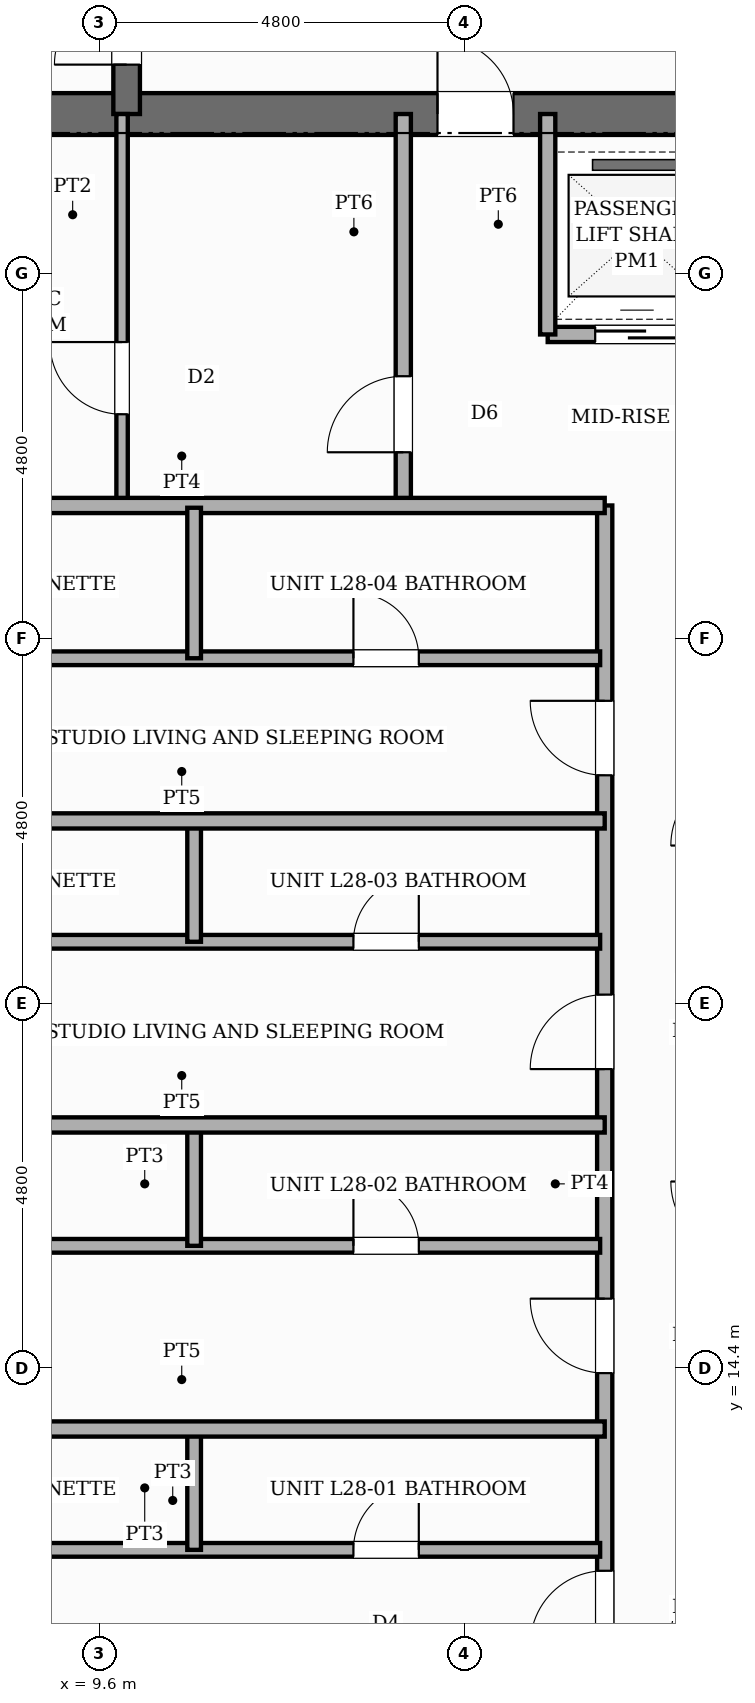
"""IFC4 building model, lengths in metres.
Left out: names, types, materials, properties, quantities, classifications, styles, units other than length and angle.
Written with IfcOpenShell. Run it as: python <this file> out.ifc"""

import sys

from ifc_helpers import new_model, si_unit, direction, frame, frame_2d, origin, place, context, subcontext, project, spatial, rectangle, extrude, element, fill, save


model = new_model("IFC4")
c1 = context("Model", 3, precision=1e-05, world=origin(), true_north=direction((0.0, 1.0)))
c2 = subcontext(c1, "Body", "Model", "MODEL_VIEW")
j1 = project(units=[si_unit("LENGTHUNIT", "METRE"), si_unit("PLANEANGLEUNIT", "RADIAN")], contexts=[c1])
p1 = place(None, origin())
s1 = spatial("IfcSite", under=j1, at=p1, CompositionType="ELEMENT")
p2 = place(p1, origin())
s2 = spatial("IfcBuilding", under=s1, at=p2, CompositionType="ELEMENT")
p3 = place(p2, frame((0.0, 0.0, 110.8)))
s3 = spatial("IfcBuildingStorey", under=s2, at=p3, CompositionType="ELEMENT", Elevation=110.8)
p4 = place(p3, frame((6.05, 30.9, 0.0), z_axis=(0.0, 0.0, 1.0), x_axis=(1.0, 0.0, 0.0)))
e1 = element("IfcWall", 1, at=p4, inside=s3, PredefinedType="SHEAR", context=c2, shape_type="SweptSolid", body=[
    extrude(rectangle(XDim=3.91, YDim=0.55, at=frame_2d((1.955, 0.0))), origin(), (0.0, 0.0, 1.0), 3.6),
])
p5 = place(p3, frame((9.96, 30.9, 0.0), z_axis=(0.0, 0.0, 1.0), x_axis=(1.0, 0.0, 0.0)))
e2 = element("IfcWall", 2, at=p5, inside=s3, PredefinedType="SHEAR", context=c2, shape_type="SweptSolid", body=[
    extrude(rectangle(XDim=8.88, YDim=0.55, at=frame_2d((4.44, 0.0))), origin(), (0.0, 0.0, 1.0), 3.6),
])
p6 = place(p5, frame((4.09, 0.0, 0.0)))
e3 = element("IfcOpeningElement", 3, at=p6, cuts=e2, PredefinedType="OPENING", context=c2, shape_type="SweptSolid", body=[
    extrude(rectangle(XDim=1.0, YDim=2.15, at=frame_2d((0.5, 1.075))), frame((0.0, 0.285, 0.0), z_axis=(0.0, -1.0, 0.0), x_axis=(1.0, 0.0, 0.0)), (0.0, 0.0, 1.0), 0.57),
])
p7 = place(p3, frame((9.96, 30.9, 0.0), z_axis=(0.0, 0.0, 1.0), x_axis=(0.0, 1.0, 0.0)))
e4 = element("IfcWall", 4, at=p7, inside=s3, PredefinedType="SHEAR", context=c2, shape_type="SweptSolid", body=[
    extrude(rectangle(XDim=14.9, YDim=0.35, at=frame_2d((7.45, 0.0))), origin(), (0.0, 0.0, 1.0), 3.6),
])
p8 = place(p7, frame((0.65, 0.0, 0.0)))
e5 = element("IfcOpeningElement", 5, at=p8, cuts=e4, PredefinedType="OPENING", context=c2, shape_type="SweptSolid", body=[
    extrude(rectangle(XDim=0.95, YDim=2.1, at=frame_2d((0.475, 1.05))), frame((0.0, 0.185, 0.0), z_axis=(0.0, -1.0, 0.0), x_axis=(1.0, 0.0, 0.0)), (0.0, 0.0, 1.0), 0.37),
])
p9 = place(p7, frame((10.45, 0.0, 0.0)))
e6 = element("IfcOpeningElement", 6, at=p9, cuts=e4, PredefinedType="OPENING", context=c2, shape_type="SweptSolid", body=[
    extrude(rectangle(XDim=1.0, YDim=2.15, at=frame_2d((0.5, 1.075))), frame((0.0, 0.185, 0.0), z_axis=(0.0, -1.0, 0.0), x_axis=(1.0, 0.0, 0.0)), (0.0, 0.0, 1.0), 0.37),
])
p10 = place(p3, frame((13.6, 25.75, 0.0), z_axis=(0.0, 0.0, 1.0), x_axis=(0.0, 1.0, 0.0)))
e7 = element("IfcWall", 7, at=p10, inside=s3, PredefinedType="POLYGONAL", context=c2, shape_type="SweptSolid", body=[
    extrude(rectangle(XDim=5.15, YDim=0.2, at=frame_2d((2.575, 0.0))), origin(), (0.0, 0.0, 1.0), 3.36),
])
p11 = place(p10, frame((0.7, 0.0, 0.0)))
e8 = element("IfcOpeningElement", 8, at=p11, cuts=e7, PredefinedType="OPENING", context=c2, shape_type="SweptSolid", body=[
    extrude(rectangle(XDim=1.0, YDim=2.15, at=frame_2d((0.5, 1.075))), frame((0.0, 0.11, 0.0), z_axis=(0.0, -1.0, 0.0), x_axis=(1.0, 0.0, 0.0)), (0.0, 0.0, 1.0), 0.22),
])
p12 = place(p3, frame((9.9, 25.75, 0.0), z_axis=(0.0, 0.0, 1.0), x_axis=(0.0, 1.0, 0.0)))
e9 = element("IfcWall", 9, at=p12, inside=s3, PredefinedType="PARTITIONING", context=c2, shape_type="SweptSolid", body=[
    extrude(rectangle(XDim=5.15, YDim=0.15, at=frame_2d((2.575, 0.0))), origin(), (0.0, 0.0, 1.0), 3.36),
])
p13 = place(p12, frame((1.2, 0.0, 0.0)))
e10 = element("IfcOpeningElement", 10, at=p13, cuts=e9, PredefinedType="OPENING", context=c2, shape_type="SweptSolid", body=[
    extrude(rectangle(XDim=0.95, YDim=2.15, at=frame_2d((0.475, 1.075))), frame((0.0, 0.085, 0.0), z_axis=(0.0, -1.0, 0.0), x_axis=(1.0, 0.0, 0.0)), (0.0, 0.0, 1.0), 0.17),
])
p14 = place(p3, frame((15.5, 28.0, 0.0), z_axis=(0.0, 0.0, 1.0), x_axis=(1.0, 0.0, 0.0)))
e11 = element("IfcWall", 11, at=p14, inside=s3, PredefinedType="POLYGONAL", context=c2, shape_type="SweptSolid", body=[
    extrude(rectangle(XDim=7.25, YDim=0.2, at=frame_2d((3.625, 0.0))), origin(), (0.0, 0.0, 1.0), 3.36),
])
p15 = place(p14, frame((0.625, 0.0, 0.0)))
e12 = element("IfcOpeningElement", 12, at=p15, cuts=e11, PredefinedType="OPENING", context=c2, shape_type="SweptSolid", body=[
    extrude(rectangle(XDim=1.1, YDim=2.15, at=frame_2d((0.55, 1.075))), frame((0.0, 0.11, 0.0), z_axis=(0.0, -1.0, 0.0), x_axis=(1.0, 0.0, 0.0)), (0.0, 0.0, 1.0), 0.22),
])
p16 = place(p14, frame((3.075, 0.0, 0.0)))
e13 = element("IfcOpeningElement", 13, at=p16, cuts=e11, PredefinedType="OPENING", context=c2, shape_type="SweptSolid", body=[
    extrude(rectangle(XDim=1.1, YDim=2.15, at=frame_2d((0.55, 1.075))), frame((0.0, 0.11, 0.0), z_axis=(0.0, -1.0, 0.0), x_axis=(1.0, 0.0, 0.0)), (0.0, 0.0, 1.0), 0.22),
])
p17 = place(p14, frame((5.525, 0.0, 0.0)))
e14 = element("IfcOpeningElement", 14, at=p17, cuts=e11, PredefinedType="OPENING", context=c2, shape_type="SweptSolid", body=[
    extrude(rectangle(XDim=1.1, YDim=2.15, at=frame_2d((0.55, 1.075))), frame((0.0, 0.11, 0.0), z_axis=(0.0, -1.0, 0.0), x_axis=(1.0, 0.0, 0.0)), (0.0, 0.0, 1.0), 0.22),
])
p18 = place(p3, frame((15.5, 28.0, 0.0), z_axis=(0.0, 0.0, 1.0), x_axis=(0.0, 1.0, 0.0)))
e15 = element("IfcWall", 15, at=p18, inside=s3, PredefinedType="POLYGONAL", context=c2, shape_type="SweptSolid", body=[
    extrude(rectangle(XDim=2.9, YDim=0.2, at=frame_2d((1.45, 0.0))), origin(), (0.0, 0.0, 1.0), 3.36),
])
p19 = place(p3, frame((16.25, 9.92, 0.0), z_axis=(0.0, 0.0, 1.0), x_axis=(0.0, 1.0, 0.0)))
e16 = element("IfcWall", 16, at=p19, inside=s3, PredefinedType="PARTITIONING", context=c2, shape_type="SweptSolid", body=[
    extrude(rectangle(XDim=15.83, YDim=0.2, at=frame_2d((7.915, 0.0))), origin(), (0.0, 0.0, 1.0), 3.36),
])
p20 = place(p19, frame((0.835, 0.0, 0.0)))
e17 = element("IfcOpeningElement", 17, at=p20, cuts=e16, PredefinedType="OPENING", context=c2, shape_type="SweptSolid", body=[
    extrude(rectangle(XDim=0.98, YDim=2.18, at=frame_2d((0.49, 1.09))), frame((0.0, 0.11, 0.0), z_axis=(0.0, -1.0, 0.0), x_axis=(1.0, 0.0, 0.0)), (0.0, 0.0, 1.0), 0.22),
])
p21 = place(p19, frame((4.415, 0.0, 0.0)))
e18 = element("IfcOpeningElement", 18, at=p21, cuts=e16, PredefinedType="OPENING", context=c2, shape_type="SweptSolid", body=[
    extrude(rectangle(XDim=0.98, YDim=2.18, at=frame_2d((0.49, 1.09))), frame((0.0, 0.11, 0.0), z_axis=(0.0, -1.0, 0.0), x_axis=(1.0, 0.0, 0.0)), (0.0, 0.0, 1.0), 0.22),
])
p22 = place(p19, frame((8.415, 0.0, 0.0)))
e19 = element("IfcOpeningElement", 19, at=p22, cuts=e16, PredefinedType="OPENING", context=c2, shape_type="SweptSolid", body=[
    extrude(rectangle(XDim=0.98, YDim=2.18, at=frame_2d((0.49, 1.09))), frame((0.0, 0.11, 0.0), z_axis=(0.0, -1.0, 0.0), x_axis=(1.0, 0.0, 0.0)), (0.0, 0.0, 1.0), 0.22),
])
p23 = place(p19, frame((12.28, 0.0, 0.0)))
e20 = element("IfcOpeningElement", 20, at=p23, cuts=e16, PredefinedType="OPENING", context=c2, shape_type="SweptSolid", body=[
    extrude(rectangle(XDim=0.98, YDim=2.18, at=frame_2d((0.49, 1.09))), frame((0.0, 0.11, 0.0), z_axis=(0.0, -1.0, 0.0), x_axis=(1.0, 0.0, 0.0)), (0.0, 0.0, 1.0), 0.22),
])
p24 = place(p3, frame((5.12, 25.75, 0.0), z_axis=(0.0, 0.0, 1.0), x_axis=(1.0, 0.0, 0.0)))
e21 = element("IfcWall", 21, at=p24, inside=s3, PredefinedType="PARTITIONING", context=c2, shape_type="SweptSolid", body=[
    extrude(rectangle(XDim=11.13, YDim=0.2, at=frame_2d((5.565, 0.0))), origin(), (0.0, 0.0, 1.0), 3.36),
])
p25 = place(p3, frame((5.14, 12.01, 0.0), z_axis=(0.0, 0.0, 1.0), x_axis=(1.0, 0.0, 0.0)))
e22 = element("IfcWall", 22, at=p25, inside=s3, PredefinedType="PLUMBINGWALL", context=c2, shape_type="SweptSolid", body=[
    extrude(rectangle(XDim=11.05, YDim=0.18, at=frame_2d((5.525, 0.0))), origin(), (0.0, 0.0, 1.0), 3.36),
])
p26 = place(p25, frame((2.189, 0.0, 0.0)))
e23 = element("IfcOpeningElement", 23, at=p26, cuts=e22, PredefinedType="OPENING", context=c2, shape_type="SweptSolid", body=[
    extrude(rectangle(XDim=0.86, YDim=2.1, at=frame_2d((0.43, 1.05))), frame((0.0, 0.1, 0.0), z_axis=(0.0, -1.0, 0.0), x_axis=(1.0, 0.0, 0.0)), (0.0, 0.0, 1.0), 0.2),
])
p27 = place(p25, frame((7.804, 0.0, 0.0)))
e24 = element("IfcOpeningElement", 24, at=p27, cuts=e22, PredefinedType="OPENING", context=c2, shape_type="SweptSolid", body=[
    extrude(rectangle(XDim=0.86, YDim=2.1, at=frame_2d((0.43, 1.05))), frame((0.0, 0.1, 0.0), z_axis=(0.0, -1.0, 0.0), x_axis=(1.0, 0.0, 0.0)), (0.0, 0.0, 1.0), 0.2),
])
p28 = place(p3, frame((10.848, 12.01, 0.0), z_axis=(0.0, 0.0, 1.0), x_axis=(0.0, 1.0, 0.0)))
e25 = element("IfcWall", 25, at=p28, inside=s3, PredefinedType="PLUMBINGWALL", context=c2, shape_type="SweptSolid", body=[
    extrude(rectangle(XDim=1.63, YDim=0.18, at=frame_2d((0.815, 0.0))), origin(), (0.0, 0.0, 1.0), 3.36),
])
p29 = place(p3, frame((5.12, 13.6, 0.0), z_axis=(0.0, 0.0, 1.0), x_axis=(1.0, 0.0, 0.0)))
e26 = element("IfcWall", 26, at=p29, inside=s3, PredefinedType="SOLIDWALL", context=c2, shape_type="SweptSolid", body=[
    extrude(rectangle(XDim=11.13, YDim=0.2, at=frame_2d((5.565, 0.0))), origin(), (0.0, 0.0, 1.0), 3.36),
])
p30 = place(p3, frame((5.12, 16.01, 0.0), z_axis=(0.0, 0.0, 1.0), x_axis=(1.0, 0.0, 0.0)))
e27 = element("IfcWall", 27, at=p30, inside=s3, PredefinedType="PLUMBINGWALL", context=c2, shape_type="SweptSolid", body=[
    extrude(rectangle(XDim=11.07, YDim=0.18, at=frame_2d((5.535, 0.0))), origin(), (0.0, 0.0, 1.0), 3.36),
])
p31 = place(p30, frame((2.209, 0.0, 0.0)))
e28 = element("IfcOpeningElement", 28, at=p31, cuts=e27, PredefinedType="OPENING", context=c2, shape_type="SweptSolid", body=[
    extrude(rectangle(XDim=0.86, YDim=2.1, at=frame_2d((0.43, 1.05))), frame((0.0, 0.1, 0.0), z_axis=(0.0, -1.0, 0.0), x_axis=(1.0, 0.0, 0.0)), (0.0, 0.0, 1.0), 0.2),
])
p32 = place(p30, frame((7.824, 0.0, 0.0)))
e29 = element("IfcOpeningElement", 29, at=p32, cuts=e27, PredefinedType="OPENING", context=c2, shape_type="SweptSolid", body=[
    extrude(rectangle(XDim=0.86, YDim=2.1, at=frame_2d((0.43, 1.05))), frame((0.0, 0.1, 0.0), z_axis=(0.0, -1.0, 0.0), x_axis=(1.0, 0.0, 0.0)), (0.0, 0.0, 1.0), 0.2),
])
p33 = place(p3, frame((10.848, 16.01, 0.0), z_axis=(0.0, 0.0, 1.0), x_axis=(0.0, 1.0, 0.0)))
e30 = element("IfcWall", 30, at=p33, inside=s3, PredefinedType="PLUMBINGWALL", context=c2, shape_type="SweptSolid", body=[
    extrude(rectangle(XDim=1.63, YDim=0.18, at=frame_2d((0.815, 0.0))), origin(), (0.0, 0.0, 1.0), 3.36),
])
p34 = place(p3, frame((5.12, 17.6, 0.0), z_axis=(0.0, 0.0, 1.0), x_axis=(1.0, 0.0, 0.0)))
e31 = element("IfcWall", 31, at=p34, inside=s3, PredefinedType="SOLIDWALL", context=c2, shape_type="SweptSolid", body=[
    extrude(rectangle(XDim=11.13, YDim=0.2, at=frame_2d((5.565, 0.0))), origin(), (0.0, 0.0, 1.0), 3.36),
])
p35 = place(p3, frame((5.12, 20.01, 0.0), z_axis=(0.0, 0.0, 1.0), x_axis=(1.0, 0.0, 0.0)))
e32 = element("IfcWall", 32, at=p35, inside=s3, PredefinedType="PLUMBINGWALL", context=c2, shape_type="SweptSolid", body=[
    extrude(rectangle(XDim=11.07, YDim=0.18, at=frame_2d((5.535, 0.0))), origin(), (0.0, 0.0, 1.0), 3.36),
])
p36 = place(p35, frame((2.209, 0.0, 0.0)))
e33 = element("IfcOpeningElement", 33, at=p36, cuts=e32, PredefinedType="OPENING", context=c2, shape_type="SweptSolid", body=[
    extrude(rectangle(XDim=0.86, YDim=2.1, at=frame_2d((0.43, 1.05))), frame((0.0, 0.1, 0.0), z_axis=(0.0, -1.0, 0.0), x_axis=(1.0, 0.0, 0.0)), (0.0, 0.0, 1.0), 0.2),
])
p37 = place(p35, frame((7.824, 0.0, 0.0)))
e34 = element("IfcOpeningElement", 34, at=p37, cuts=e32, PredefinedType="OPENING", context=c2, shape_type="SweptSolid", body=[
    extrude(rectangle(XDim=0.86, YDim=2.1, at=frame_2d((0.43, 1.05))), frame((0.0, 0.1, 0.0), z_axis=(0.0, -1.0, 0.0), x_axis=(1.0, 0.0, 0.0)), (0.0, 0.0, 1.0), 0.2),
])
p38 = place(p3, frame((10.848, 20.01, 0.0), z_axis=(0.0, 0.0, 1.0), x_axis=(0.0, 1.0, 0.0)))
e35 = element("IfcWall", 35, at=p38, inside=s3, PredefinedType="PLUMBINGWALL", context=c2, shape_type="SweptSolid", body=[
    extrude(rectangle(XDim=1.63, YDim=0.18, at=frame_2d((0.815, 0.0))), origin(), (0.0, 0.0, 1.0), 3.36),
])
p39 = place(p3, frame((5.12, 21.6, 0.0), z_axis=(0.0, 0.0, 1.0), x_axis=(1.0, 0.0, 0.0)))
e36 = element("IfcWall", 36, at=p39, inside=s3, PredefinedType="SOLIDWALL", context=c2, shape_type="SweptSolid", body=[
    extrude(rectangle(XDim=11.13, YDim=0.2, at=frame_2d((5.565, 0.0))), origin(), (0.0, 0.0, 1.0), 3.36),
])
p40 = place(p3, frame((5.12, 23.74, 0.0), z_axis=(0.0, 0.0, 1.0), x_axis=(1.0, 0.0, 0.0)))
e37 = element("IfcWall", 37, at=p40, inside=s3, PredefinedType="PLUMBINGWALL", context=c2, shape_type="SweptSolid", body=[
    extrude(rectangle(XDim=11.07, YDim=0.18, at=frame_2d((5.535, 0.0))), origin(), (0.0, 0.0, 1.0), 2.54),
])
p41 = place(p40, frame((2.209, 0.0, 0.0)))
e38 = element("IfcOpeningElement", 38, at=p41, cuts=e37, PredefinedType="OPENING", context=c2, shape_type="SweptSolid", body=[
    extrude(rectangle(XDim=0.86, YDim=2.1, at=frame_2d((0.43, 1.05))), frame((0.0, 0.1, 0.0), z_axis=(0.0, -1.0, 0.0), x_axis=(1.0, 0.0, 0.0)), (0.0, 0.0, 1.0), 0.2),
])
p42 = place(p40, frame((7.824, 0.0, 0.0)))
e39 = element("IfcOpeningElement", 39, at=p42, cuts=e37, PredefinedType="OPENING", context=c2, shape_type="SweptSolid", body=[
    extrude(rectangle(XDim=0.86, YDim=2.1, at=frame_2d((0.43, 1.05))), frame((0.0, 0.1, 0.0), z_axis=(0.0, -1.0, 0.0), x_axis=(1.0, 0.0, 0.0)), (0.0, 0.0, 1.0), 0.2),
])
p43 = place(p3, frame((10.848, 23.74, 0.0), z_axis=(0.0, 0.0, 1.0), x_axis=(0.0, 1.0, 0.0)))
e40 = element("IfcWall", 40, at=p43, inside=s3, PredefinedType="PLUMBINGWALL", context=c2, shape_type="SweptSolid", body=[
    extrude(rectangle(XDim=1.98, YDim=0.18, at=frame_2d((0.99, 0.0))), origin(), (0.0, 0.0, 1.0), 3.36),
])
p44 = place(p8, origin())
e41 = element("IfcDoor", 41, at=p44, inside=s3, OperationType="SINGLE_SWING_LEFT", PredefinedType="DOOR", context=c2, shape_type="SweptSolid", body=[
    extrude(rectangle(XDim=0.95, YDim=2.1, at=frame_2d((0.475, 1.05))), frame((0.0, 0.025, 0.0), z_axis=(0.0, -1.0, 0.0), x_axis=(1.0, 0.0, 0.0)), (0.0, 0.0, 1.0), 0.05),
])
fill(e5, e41)
p45 = place(p6, origin())
e42 = element("IfcDoor", 42, at=p45, inside=s3, OperationType="SINGLE_SWING_LEFT", PredefinedType="DOOR", context=c2, shape_type="SweptSolid", body=[
    extrude(rectangle(XDim=1.0, YDim=2.15, at=frame_2d((0.5, 1.075))), frame((0.0, 0.025, 0.0), z_axis=(0.0, -1.0, 0.0), x_axis=(1.0, 0.0, 0.0)), (0.0, 0.0, 1.0), 0.05),
])
fill(e3, e42)
p46 = place(p11, origin())
e43 = element("IfcDoor", 43, at=p46, inside=s3, OperationType="SINGLE_SWING_LEFT", PredefinedType="DOOR", context=c2, shape_type="SweptSolid", body=[
    extrude(rectangle(XDim=1.0, YDim=2.15, at=frame_2d((0.5, 1.075))), frame((0.0, 0.025, 0.0), z_axis=(0.0, -1.0, 0.0), x_axis=(1.0, 0.0, 0.0)), (0.0, 0.0, 1.0), 0.05),
])
fill(e8, e43)
p47 = place(p13, origin())
e44 = element("IfcDoor", 44, at=p47, inside=s3, OperationType="SINGLE_SWING_RIGHT", PredefinedType="DOOR", context=c2, shape_type="SweptSolid", body=[
    extrude(rectangle(XDim=0.95, YDim=2.15, at=frame_2d((0.475, 1.075))), frame((0.0, 0.025, 0.0), z_axis=(0.0, -1.0, 0.0), x_axis=(1.0, 0.0, 0.0)), (0.0, 0.0, 1.0), 0.05),
])
fill(e10, e44)
p48 = place(p15, origin())
e45 = element("IfcDoor", 45, at=p48, inside=s3, OperationType="SLIDING_TO_LEFT", PredefinedType="DOOR", context=c2, shape_type="SweptSolid", body=[
    extrude(rectangle(XDim=1.1, YDim=2.15, at=frame_2d((0.55, 1.075))), frame((0.0, 0.025, 0.0), z_axis=(0.0, -1.0, 0.0), x_axis=(1.0, 0.0, 0.0)), (0.0, 0.0, 1.0), 0.05),
])
fill(e12, e45)
p49 = place(p20, origin())
e46 = element("IfcDoor", 46, at=p49, inside=s3, OperationType="SINGLE_SWING_LEFT", PredefinedType="DOOR", context=c2, shape_type="SweptSolid", body=[
    extrude(rectangle(XDim=0.98, YDim=2.18, at=frame_2d((0.49, 1.09))), frame((0.0, 0.025, 0.0), z_axis=(0.0, -1.0, 0.0), x_axis=(1.0, 0.0, 0.0)), (0.0, 0.0, 1.0), 0.05),
])
fill(e17, e46)
p50 = place(p27, origin())
e47 = element("IfcDoor", 47, at=p50, inside=s3, OperationType="SINGLE_SWING_RIGHT", PredefinedType="DOOR", context=c2, shape_type="SweptSolid", body=[
    extrude(rectangle(XDim=0.86, YDim=2.1, at=frame_2d((0.43, 1.05))), frame((0.0, 0.025, 0.0), z_axis=(0.0, -1.0, 0.0), x_axis=(1.0, 0.0, 0.0)), (0.0, 0.0, 1.0), 0.05),
])
fill(e24, e47)
p51 = place(p21, origin())
e48 = element("IfcDoor", 48, at=p51, inside=s3, OperationType="SINGLE_SWING_RIGHT", PredefinedType="DOOR", context=c2, shape_type="SweptSolid", body=[
    extrude(rectangle(XDim=0.98, YDim=2.18, at=frame_2d((0.49, 1.09))), frame((0.0, 0.025, 0.0), z_axis=(0.0, -1.0, 0.0), x_axis=(1.0, 0.0, 0.0)), (0.0, 0.0, 1.0), 0.05),
])
fill(e18, e48)
p52 = place(p32, origin())
e49 = element("IfcDoor", 49, at=p52, inside=s3, OperationType="SINGLE_SWING_LEFT", PredefinedType="DOOR", context=c2, shape_type="SweptSolid", body=[
    extrude(rectangle(XDim=0.86, YDim=2.1, at=frame_2d((0.43, 1.05))), frame((0.0, 0.025, 0.0), z_axis=(0.0, -1.0, 0.0), x_axis=(1.0, 0.0, 0.0)), (0.0, 0.0, 1.0), 0.05),
])
fill(e29, e49)
p53 = place(p22, origin())
e50 = element("IfcDoor", 50, at=p53, inside=s3, OperationType="SINGLE_SWING_LEFT", PredefinedType="DOOR", context=c2, shape_type="SweptSolid", body=[
    extrude(rectangle(XDim=0.98, YDim=2.18, at=frame_2d((0.49, 1.09))), frame((0.0, 0.025, 0.0), z_axis=(0.0, -1.0, 0.0), x_axis=(1.0, 0.0, 0.0)), (0.0, 0.0, 1.0), 0.05),
])
fill(e19, e50)
p54 = place(p37, origin())
e51 = element("IfcDoor", 51, at=p54, inside=s3, OperationType="SINGLE_SWING_RIGHT", PredefinedType="DOOR", context=c2, shape_type="SweptSolid", body=[
    extrude(rectangle(XDim=0.86, YDim=2.1, at=frame_2d((0.43, 1.05))), frame((0.0, 0.025, 0.0), z_axis=(0.0, -1.0, 0.0), x_axis=(1.0, 0.0, 0.0)), (0.0, 0.0, 1.0), 0.05),
])
fill(e34, e51)
p55 = place(p23, origin())
e52 = element("IfcDoor", 52, at=p55, inside=s3, OperationType="SINGLE_SWING_RIGHT", PredefinedType="DOOR", context=c2, shape_type="SweptSolid", body=[
    extrude(rectangle(XDim=0.98, YDim=2.18, at=frame_2d((0.49, 1.09))), frame((0.0, 0.025, 0.0), z_axis=(0.0, -1.0, 0.0), x_axis=(1.0, 0.0, 0.0)), (0.0, 0.0, 1.0), 0.05),
])
fill(e20, e52)
p56 = place(p42, origin())
e53 = element("IfcDoor", 53, at=p56, inside=s3, OperationType="SINGLE_SWING_LEFT", PredefinedType="DOOR", context=c2, shape_type="SweptSolid", body=[
    extrude(rectangle(XDim=0.86, YDim=2.1, at=frame_2d((0.43, 1.05))), frame((0.0, 0.025, 0.0), z_axis=(0.0, -1.0, 0.0), x_axis=(1.0, 0.0, 0.0)), (0.0, 0.0, 1.0), 0.05),
])
fill(e39, e53)
save(model, sys.argv[1])
